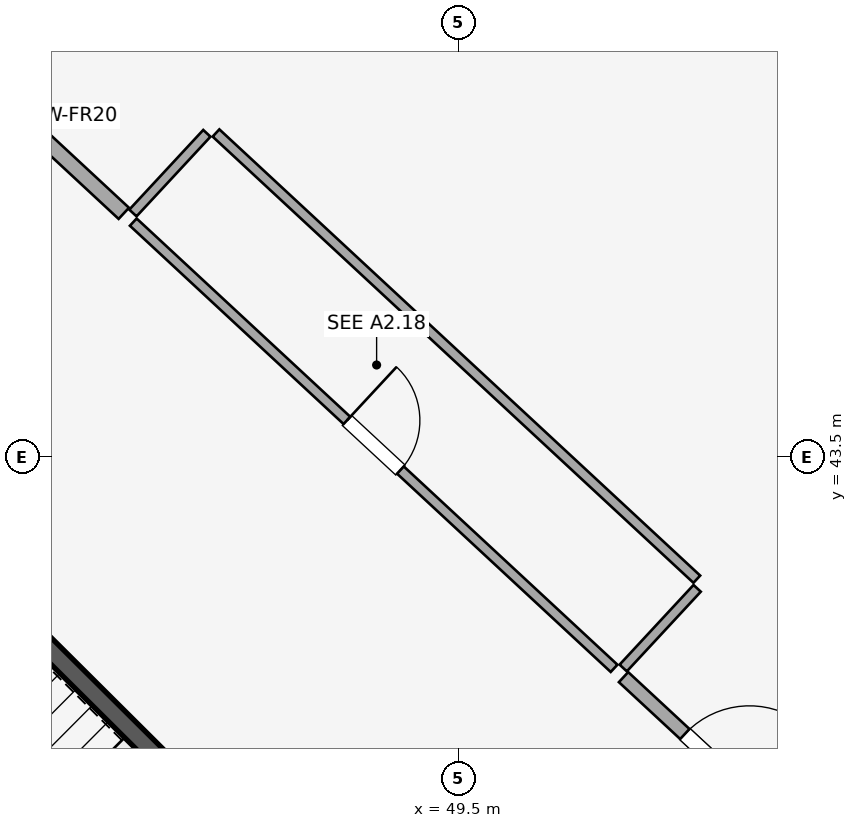
"""IFC4 building model, lengths in metres.
Left out: names, types, materials, properties, quantities, classifications, styles, units other than length and angle.
Written with IfcOpenShell. Run it as: python <this file> out.ifc"""

import sys

from ifc_helpers import new_model, si_unit, direction, frame, frame_2d, origin, place, context, subcontext, project, spatial, rectangle, extrude, element, fill, save


model = new_model("IFC4")
c1 = context("Model", 3, precision=1e-05, world=origin(), true_north=direction((0.0, 1.0)))
c2 = subcontext(c1, "Body", "Model", "MODEL_VIEW")
j1 = project(units=[si_unit("LENGTHUNIT", "METRE"), si_unit("PLANEANGLEUNIT", "RADIAN")], contexts=[c1])
p1 = place(None, origin())
s1 = spatial("IfcSite", under=j1, at=p1, CompositionType="ELEMENT")
p2 = place(p1, origin())
s2 = spatial("IfcBuilding", under=s1, at=p2, CompositionType="ELEMENT")
p3 = place(p2, frame((0.0, 0.0, -5.4)))
s3 = spatial("IfcBuildingStorey", under=s2, at=p3, CompositionType="ELEMENT", Elevation=-5.4)
p4 = place(p3, frame((30.503, 44.525, 0.0), z_axis=(0.0, 0.0, 1.0), x_axis=(0.708961581499, -0.705247102765, 0.0)))
e1 = element("IfcWall", 1, at=p4, inside=s3, PredefinedType="SOLIDWALL", context=c2, shape_type="SweptSolid", body=[
    extrude(rectangle(XDim=20.835, YDim=0.42, at=frame_2d((10.418, 0.0))), origin(), (0.0, 0.0, 1.0), 4.45),
])
p5 = place(p3, frame((47.369, 37.731, 0.0), z_axis=(0.0, 0.0, 1.0), x_axis=(-0.708891762409, 0.705317282639, 0.0)))
e2 = element("IfcWall", 2, at=p5, inside=s3, PredefinedType="SHEAR", context=c2, shape_type="SweptSolid", body=[
    extrude(rectangle(XDim=10.45, YDim=0.25, at=frame_2d((5.225, 0.0))), origin(), (0.0, 0.0, 1.0), 5.05),
])
p6 = place(p3, frame((65.808, 58.779, 0.0), z_axis=(0.0, 0.0, 1.0), x_axis=(-0.911840313279, -0.41054505609, 0.0)))
e3 = element("IfcWall", 3, at=p6, inside=s3, PredefinedType="PARTITIONING", context=c2, shape_type="SweptSolid", body=[
    extrude(rectangle(XDim=24.818, YDim=0.15, at=frame_2d((12.409, 0.0))), origin(), (0.0, 0.0, 1.0), 3.8),
])
p7 = place(p3, frame((45.215, 46.593, 0.0), z_axis=(0.0, 0.0, 1.0), x_axis=(0.73300806751, -0.680219944551, 0.0)))
e4 = element("IfcWall", 4, at=p7, inside=s3, PredefinedType="PARTITIONING", context=c2, shape_type="SweptSolid", body=[
    extrude(rectangle(XDim=8.63, YDim=0.13, at=frame_2d((4.315, 0.0))), origin(), (0.0, 0.0, 1.0), 3.8),
])
p8 = place(p7, frame((3.835, 0.0, 0.0)))
e5 = element("IfcOpeningElement", 5, at=p8, cuts=e4, PredefinedType="OPENING", context=c2, shape_type="SweptSolid", body=[
    extrude(rectangle(XDim=0.96, YDim=2.24, at=frame_2d((0.48, 1.12))), frame((0.0, 0.075, 0.0), z_axis=(0.0, -1.0, 0.0), x_axis=(1.0, 0.0, 0.0)), (0.0, 0.0, 1.0), 0.15),
])
p9 = place(p3, frame((46.304, 47.765, 0.0), z_axis=(0.0, 0.0, 1.0), x_axis=(0.732994977595, -0.68023405003, 0.0)))
e6 = element("IfcWall", 6, at=p9, inside=s3, PredefinedType="PARTITIONING", context=c2, shape_type="SweptSolid", body=[
    extrude(rectangle(XDim=8.63, YDim=0.13, at=frame_2d((4.315, 0.0))), origin(), (0.0, 0.0, 1.0), 3.8),
])
for number, where, z_axis, x_axis in (
    (7, (45.211, 46.713, 0.0), (0.0, 0.0, 1.0), (0.68, 0.733, 0.0)),
    (8, (51.661, 40.727, 0.0), (0.0, 0.0, 1.0), (0.68, 0.733, 0.0)),
):
    element("IfcWall", number, at=place(p3, frame(where, z_axis=z_axis, x_axis=x_axis)), inside=s3, PredefinedType="PARTITIONING", context=c2, shape_type="SweptSolid", body=[
        extrude(rectangle(XDim=1.43, YDim=0.13, at=frame_2d((0.715, 0.0))), origin(), (0.0, 0.0, 1.0), 3.8),
    ])
p10 = place(p3, frame((43.163, 48.497, 0.0), z_axis=(0.0, 0.0, 1.0), x_axis=(0.732978614057, -0.680251682347, 0.0)))
e9 = element("IfcWall", 9, at=p10, inside=s3, PredefinedType="PARTITIONING", context=c2, shape_type="SweptSolid", body=[
    extrude(rectangle(XDim=2.63, YDim=0.2, at=frame_2d((1.315, 0.0))), origin(), (0.0, 0.0, 1.0), 3.8),
])
p11 = place(p3, frame((51.666, 40.607, 0.0), z_axis=(0.0, 0.0, 1.0), x_axis=(0.732995223413, -0.680233785146, 0.0)))
e10 = element("IfcWall", 10, at=p11, inside=s3, PredefinedType="PARTITIONING", context=c2, shape_type="SweptSolid", body=[
    extrude(rectangle(XDim=6.594, YDim=0.18, at=frame_2d((3.297, 0.0))), origin(), (0.0, 0.0, 1.0), 3.8),
])
p12 = place(p11, frame((1.1, 0.0, 0.0)))
e11 = element("IfcOpeningElement", 11, at=p12, cuts=e10, PredefinedType="OPENING", context=c2, shape_type="SweptSolid", body=[
    extrude(rectangle(XDim=1.16, YDim=2.24, at=frame_2d((0.58, 1.12))), frame((0.0, 0.1, 0.0), z_axis=(0.0, -1.0, 0.0), x_axis=(1.0, 0.0, 0.0)), (0.0, 0.0, 1.0), 0.2),
])
p13 = place(p8, origin())
e12 = element("IfcDoor", 12, at=p13, inside=s3, OperationType="SINGLE_SWING_LEFT", PredefinedType="DOOR", context=c2, shape_type="SweptSolid", body=[
    extrude(rectangle(XDim=0.96, YDim=2.24, at=frame_2d((0.48, 1.12))), frame((0.0, 0.025, 0.0), z_axis=(0.0, -1.0, 0.0), x_axis=(1.0, 0.0, 0.0)), (0.0, 0.0, 1.0), 0.05),
])
fill(e5, e12)
p14 = place(p12, origin())
e13 = element("IfcDoor", 13, at=p14, inside=s3, OperationType="SINGLE_SWING_RIGHT", PredefinedType="DOOR", context=c2, shape_type="SweptSolid", body=[
    extrude(rectangle(XDim=1.16, YDim=2.24, at=frame_2d((0.58, 1.12))), frame((0.0, 0.025, 0.0), z_axis=(0.0, -1.0, 0.0), x_axis=(1.0, 0.0, 0.0)), (0.0, 0.0, 1.0), 0.05),
])
fill(e11, e13)
save(model, sys.argv[1])
